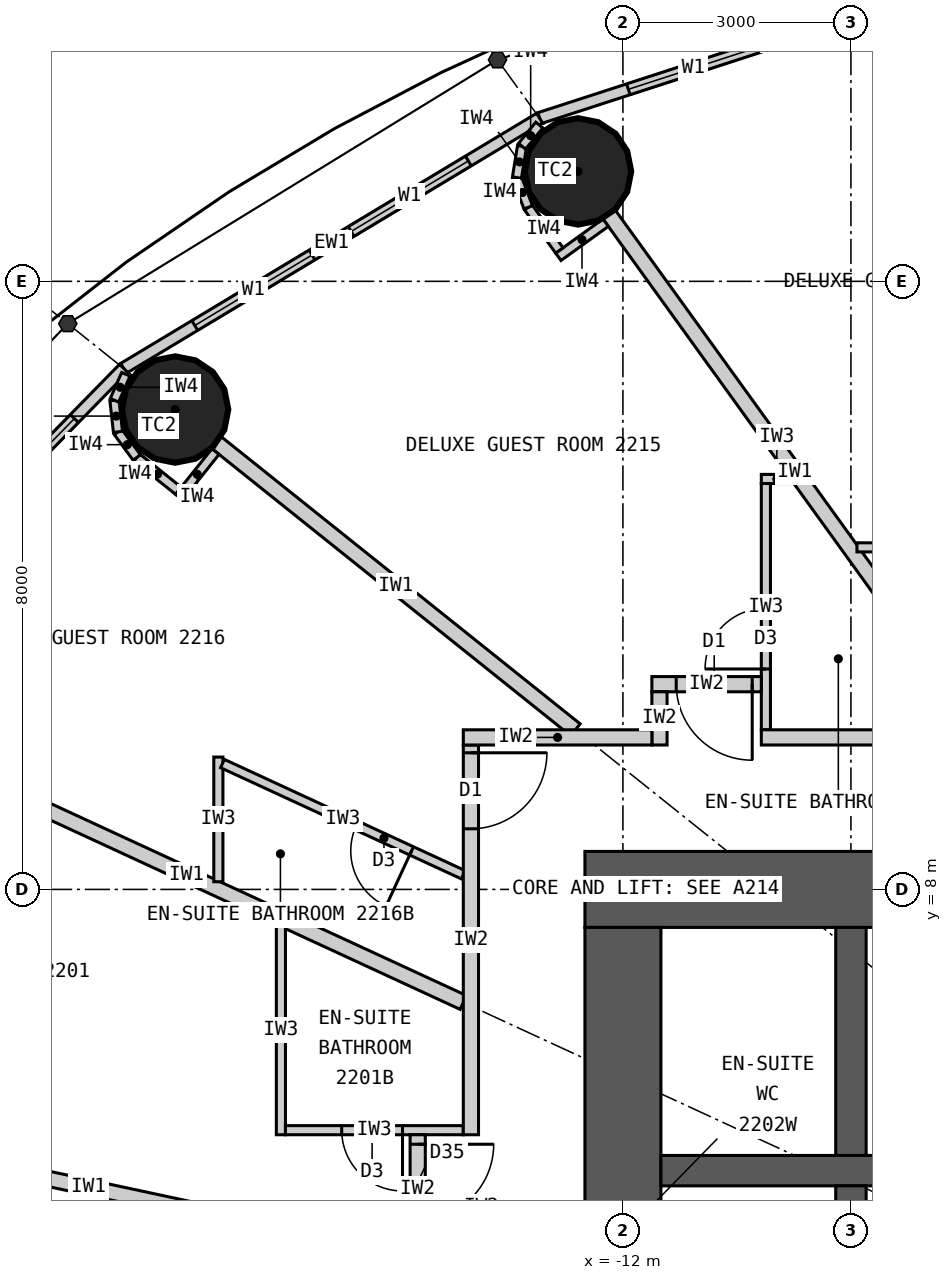
"""IFC4 building model, lengths in metres.
Left out: names, types, materials, properties, quantities, classifications, styles, units other than length and angle.
Written with IfcOpenShell. Run it as: python <this file> out.ifc"""

import sys

from ifc_helpers import new_model, si_unit, direction, frame, frame_2d, origin, origin_2d, place, context, subcontext, project, spatial, rectangle, circle, extrude, element, fill, save


model = new_model("IFC4")
c1 = context("Model", 3, precision=1e-05, world=origin(), true_north=direction((0.0, 1.0)))
c2 = subcontext(c1, "Body", "Model", "MODEL_VIEW")
j1 = project(units=[si_unit("LENGTHUNIT", "METRE"), si_unit("PLANEANGLEUNIT", "RADIAN")], contexts=[c1])
p1 = place(None, origin())
s1 = spatial("IfcSite", under=j1, at=p1, CompositionType="ELEMENT")
p2 = place(p1, origin())
s2 = spatial("IfcBuilding", under=s1, at=p2, CompositionType="ELEMENT")
p3 = place(p2, frame((0.0, 0.0, 87.0)))
s3 = spatial("IfcBuildingStorey", under=s2, at=p3, CompositionType="ELEMENT", Elevation=87.0)
for number, where, z_axis, x_axis in (
    (1, (-12.591, 17.447, 0.0), (0.0, 0.0, 1.0), (1.0, 0.0, 0.0)),
    (2, (-17.892, 14.313, 0.0), (0.0, 0.0, 1.0), (1.0, 0.0, 0.0)),
):
    element("IfcColumn", number, at=place(p3, frame(where, z_axis=z_axis, x_axis=x_axis)), inside=s3, PredefinedType="COLUMN", context=c2, shape_type="SweptSolid", body=[
        extrude(circle(Radius=0.7, at=origin_2d()), origin(), (0.0, 0.0, 1.0), 3.3),
    ])
p4 = place(p3, frame((-12.5, 8.0, 0.0), z_axis=(0.0, 0.0, 1.0), x_axis=(1.0, 0.0, 0.0)))
e3 = element("IfcWall", 3, at=p4, inside=s3, PredefinedType="SHEAR", context=c2, shape_type="SweptSolid", body=[
    extrude(rectangle(XDim=25.0, YDim=1.0, at=frame_2d((12.5, 0.0))), origin(), (0.0, 0.0, 1.0), 3.3),
])
p5 = place(p4, frame((11.2, 0.0, 0.0)))
e4 = element("IfcOpeningElement", 4, at=p5, cuts=e3, PredefinedType="OPENING", context=c2, shape_type="SweptSolid", body=[
    extrude(rectangle(XDim=1.2, YDim=2.2, at=frame_2d((0.6, 1.1))), frame((0.0, 0.51, 0.0), z_axis=(0.0, -1.0, 0.0), x_axis=(1.0, 0.0, 0.0)), (0.0, 0.0, 1.0), 1.02),
])
p6 = place(p4, frame((18.8, 0.0, 0.0)))
e5 = element("IfcOpeningElement", 5, at=p6, cuts=e3, PredefinedType="OPENING", context=c2, shape_type="SweptSolid", body=[
    extrude(rectangle(XDim=0.9, YDim=2.2, at=frame_2d((0.45, 1.1))), frame((0.0, 0.51, 0.0), z_axis=(0.0, -1.0, 0.0), x_axis=(1.0, 0.0, 0.0)), (0.0, 0.0, 1.0), 1.02),
])
p7 = place(p3, frame((-12.0, 7.5, 0.0), z_axis=(0.0, 0.0, 1.0), x_axis=(0.0, -1.0, 0.0)))
e6 = element("IfcWall", 6, at=p7, inside=s3, PredefinedType="SHEAR", context=c2, shape_type="SweptSolid", body=[
    extrude(rectangle(XDim=15.0, YDim=1.0, at=frame_2d((7.5, 0.0))), origin(), (0.0, 0.0, 1.0), 3.3),
])
p8 = place(p7, frame((6.6, 0.0, 0.0)))
e7 = element("IfcOpeningElement", 7, at=p8, cuts=e6, PredefinedType="OPENING", context=c2, shape_type="SweptSolid", body=[
    extrude(rectangle(XDim=1.8, YDim=2.2, at=frame_2d((0.9, 1.1))), frame((0.0, 0.51, 0.0), z_axis=(0.0, -1.0, 0.0), x_axis=(1.0, 0.0, 0.0)), (0.0, 0.0, 1.0), 1.02),
])
p9 = place(p3, frame((-11.5, 4.3, 0.0), z_axis=(0.0, 0.0, 1.0), x_axis=(1.0, 0.0, 0.0)))
e8 = element("IfcWall", 8, at=p9, inside=s3, PredefinedType="SHEAR", context=c2, shape_type="SweptSolid", body=[
    extrude(rectangle(XDim=23.0, YDim=0.4, at=frame_2d((11.5, 0.0))), origin(), (0.0, 0.0, 1.0), 3.3),
])
p10 = place(p3, frame((-9.0, 4.5, 0.0), z_axis=(0.0, 0.0, 1.0), x_axis=(0.0, 1.0, 0.0)))
e9 = element("IfcWall", 9, at=p10, inside=s3, PredefinedType="SHEAR", context=c2, shape_type="SweptSolid", body=[
    extrude(rectangle(XDim=3.0, YDim=0.4, at=frame_2d((1.5, 0.0))), origin(), (0.0, 0.0, 1.0), 3.3),
])
p11 = place(p3, frame((-9.0, 1.75, 0.0), z_axis=(0.0, 0.0, 1.0), x_axis=(0.0, 1.0, 0.0)))
e10 = element("IfcWall", 10, at=p11, inside=s3, PredefinedType="SHEAR", context=c2, shape_type="SweptSolid", body=[
    extrude(rectangle(XDim=2.35, YDim=0.4, at=frame_2d((1.175, 0.0))), origin(), (0.0, 0.0, 1.0), 3.3),
])
p12 = place(p3, frame((-6.766, 20.202, 0.0), z_axis=(0.0, 0.0, 1.0), x_axis=(-0.951137534625, -0.308767534285, 0.0)))
e11 = element("IfcWall", 11, at=p12, inside=s3, PredefinedType="ELEMENTEDWALL", context=c2, shape_type="SweptSolid", body=[
    extrude(rectangle(XDim=6.655, YDim=0.15, at=frame_2d((3.328, 0.0))), origin(), (0.0, 0.0, 1.0), 3.12),
])
p13 = place(p12, frame((1.228, 0.0, 0.9)))
e12 = element("IfcOpeningElement", 12, at=p13, cuts=e11, PredefinedType="OPENING", context=c2, shape_type="SweptSolid", body=[
    extrude(rectangle(XDim=1.8, YDim=1.9, at=frame_2d((0.9, 0.95))), frame((0.0, 0.085, 0.0), z_axis=(0.0, -1.0, 0.0), x_axis=(1.0, 0.0, 0.0)), (0.0, 0.0, 1.0), 0.17),
])
p14 = place(p12, frame((3.628, 0.0, 0.9)))
e13 = element("IfcOpeningElement", 13, at=p14, cuts=e11, PredefinedType="OPENING", context=c2, shape_type="SweptSolid", body=[
    extrude(rectangle(XDim=1.8, YDim=1.9, at=frame_2d((0.9, 0.95))), frame((0.0, 0.085, 0.0), z_axis=(0.0, -1.0, 0.0), x_axis=(1.0, 0.0, 0.0)), (0.0, 0.0, 1.0), 0.17),
])
p15 = place(p3, frame((-13.096, 18.147, 0.0), z_axis=(0.0, 0.0, 1.0), x_axis=(-0.856983180864, -0.515344377787, 0.0)))
e14 = element("IfcWall", 14, at=p15, inside=s3, PredefinedType="ELEMENTEDWALL", context=c2, shape_type="SweptSolid", body=[
    extrude(rectangle(XDim=6.386, YDim=0.15, at=frame_2d((3.193, 0.0))), origin(), (0.0, 0.0, 1.0), 3.12),
])
p16 = place(p15, frame((1.093, 0.0, 0.9)))
e15 = element("IfcOpeningElement", 15, at=p16, cuts=e14, PredefinedType="OPENING", context=c2, shape_type="SweptSolid", body=[
    extrude(rectangle(XDim=1.8, YDim=1.9, at=frame_2d((0.9, 0.95))), frame((0.0, 0.085, 0.0), z_axis=(0.0, -1.0, 0.0), x_axis=(1.0, 0.0, 0.0)), (0.0, 0.0, 1.0), 0.17),
])
p17 = place(p15, frame((3.493, 0.0, 0.9)))
e16 = element("IfcOpeningElement", 16, at=p17, cuts=e14, PredefinedType="OPENING", context=c2, shape_type="SweptSolid", body=[
    extrude(rectangle(XDim=1.8, YDim=1.9, at=frame_2d((0.9, 0.95))), frame((0.0, 0.085, 0.0), z_axis=(0.0, -1.0, 0.0), x_axis=(1.0, 0.0, 0.0)), (0.0, 0.0, 1.0), 0.17),
])
p18 = place(p3, frame((-18.57, 14.856, 0.0), z_axis=(0.0, 0.0, 1.0), x_axis=(-0.699602905915, -0.714531856557, 0.0)))
e17 = element("IfcWall", 17, at=p18, inside=s3, PredefinedType="ELEMENTEDWALL", context=c2, shape_type="SweptSolid", body=[
    extrude(rectangle(XDim=6.051, YDim=0.15, at=frame_2d((3.025, 0.0))), origin(), (0.0, 0.0, 1.0), 3.12),
])
p19 = place(p18, frame((0.926, 0.0, 0.9)))
e18 = element("IfcOpeningElement", 18, at=p19, cuts=e17, PredefinedType="OPENING", context=c2, shape_type="SweptSolid", body=[
    extrude(rectangle(XDim=1.8, YDim=1.9, at=frame_2d((0.9, 0.95))), frame((0.0, 0.085, 0.0), z_axis=(0.0, -1.0, 0.0), x_axis=(1.0, 0.0, 0.0)), (0.0, 0.0, 1.0), 0.17),
])
p20 = place(p18, frame((3.325, 0.0, 0.9)))
e19 = element("IfcOpeningElement", 19, at=p20, cuts=e17, PredefinedType="OPENING", context=c2, shape_type="SweptSolid", body=[
    extrude(rectangle(XDim=1.8, YDim=1.9, at=frame_2d((0.9, 0.95))), frame((0.0, 0.085, 0.0), z_axis=(0.0, -1.0, 0.0), x_axis=(1.0, 0.0, 0.0)), (0.0, 0.0, 1.0), 0.17),
])
p21 = place(p3, frame((-7.289, 10.1, 0.0), z_axis=(0.0, 0.0, 1.0), x_axis=(-0.585198353053, 0.810890182197, 0.0)))
e20 = element("IfcWall", 20, at=p21, inside=s3, PredefinedType="PARTITIONING", context=c2, shape_type="SweptSolid", body=[
    extrude(rectangle(XDim=8.36, YDim=0.2, at=frame_2d((4.18, 0.0))), origin(), (0.0, 0.0, 1.0), 2.27),
])
p22 = place(p3, frame((-12.625, 10.1, 0.0), z_axis=(0.0, 0.0, 1.0), x_axis=(-0.780892451574, 0.624665493744, 0.0)))
e21 = element("IfcWall", 21, at=p22, inside=s3, PredefinedType="PARTITIONING", context=c2, shape_type="SweptSolid", body=[
    extrude(rectangle(XDim=6.045, YDim=0.2, at=frame_2d((3.022, 0.0))), origin(), (0.0, 0.0, 1.0), 2.27),
])
p23 = place(p3, frame((-14.1, 6.512, 0.0), z_axis=(0.0, 0.0, 1.0), x_axis=(-0.907832871056, 0.419332181247, 0.0)))
e22 = element("IfcWall", 22, at=p23, inside=s3, PredefinedType="PARTITIONING", context=c2, shape_type="SweptSolid", body=[
    extrude(rectangle(XDim=8.023, YDim=0.2, at=frame_2d((4.011, 0.0))), origin(), (0.0, 0.0, 1.0), 2.22),
])
p24 = place(p3, frame((-14.1, 3.022, 0.0), z_axis=(0.0, 0.0, 1.0), x_axis=(-0.977790014929, 0.209586943072, 0.0)))
e23 = element("IfcWall", 23, at=p24, inside=s3, PredefinedType="PARTITIONING", context=c2, shape_type="SweptSolid", body=[
    extrude(rectangle(XDim=10.087, YDim=0.2, at=frame_2d((5.043, 0.0))), origin(), (0.0, 0.0, 1.0), 2.27),
])
p25 = place(p3, frame((-16.5, 7.521, 0.0), z_axis=(0.0, 0.0, 1.0), x_axis=(0.0, -1.0, 0.0)))
e24 = element("IfcWall", 24, at=p25, inside=s3, PredefinedType="PARTITIONING", context=c2, shape_type="SweptSolid", body=[
    extrude(rectangle(XDim=2.749, YDim=0.12, at=frame_2d((1.374, 0.0))), origin(), (0.0, 0.0, 1.0), 3.12),
])
p26 = place(p3, frame((-14.1, 4.833, 0.0), z_axis=(0.0, 0.0, 1.0), x_axis=(-1.0, 0.0, 0.0)))
e25 = element("IfcWall", 25, at=p26, inside=s3, PredefinedType="PARTITIONING", context=c2, shape_type="SweptSolid", body=[
    extrude(rectangle(XDim=2.34, YDim=0.12, at=frame_2d((1.17, 0.0))), origin(), (0.0, 0.0, 1.0), 3.12),
])
p27 = place(p26, frame((0.8, 0.0, 0.0)))
e26 = element("IfcOpeningElement", 26, at=p27, cuts=e25, PredefinedType="OPENING", context=c2, shape_type="SweptSolid", body=[
    extrude(rectangle(XDim=0.8, YDim=2.1, at=frame_2d((0.4, 1.05))), frame((0.0, 0.07, 0.0), z_axis=(0.0, -1.0, 0.0), x_axis=(1.0, 0.0, 0.0)), (0.0, 0.0, 1.0), 0.14),
])
p28 = place(p3, frame((-8.921, 12.5, 0.0), z_axis=(0.0, 0.0, 1.0), x_axis=(1.0, 0.0, 0.0)))
e27 = element("IfcWall", 27, at=p28, inside=s3, PredefinedType="PARTITIONING", context=c2, shape_type="SweptSolid", body=[
    extrude(rectangle(XDim=3.372, YDim=0.12, at=frame_2d((1.686, 0.0))), origin(), (0.0, 0.0, 1.0), 3.12),
])
p29 = place(p3, frame((-9.771, 13.4, 0.0), z_axis=(0.0, 0.0, 1.0), x_axis=(-1.0, 0.0, 0.0)))
e28 = element("IfcWall", 28, at=p29, inside=s3, PredefinedType="PARTITIONING", context=c2, shape_type="SweptSolid", body=[
    extrude(rectangle(XDim=0.408, YDim=0.12, at=frame_2d((0.204, 0.0))), origin(), (0.0, 0.0, 1.0), 3.12),
])
p30 = place(p3, frame((-10.119, 10.1, 0.0), z_axis=(0.0, 0.0, 1.0), x_axis=(0.0, 1.0, 0.0)))
e29 = element("IfcWall", 29, at=p30, inside=s3, PredefinedType="PARTITIONING", context=c2, shape_type="SweptSolid", body=[
    extrude(rectangle(XDim=3.24, YDim=0.12, at=frame_2d((1.62, 0.0))), origin(), (0.0, 0.0, 1.0), 3.12),
])
p31 = place(p30, frame((0.8, 0.0, 0.0)))
e30 = element("IfcOpeningElement", 30, at=p31, cuts=e29, PredefinedType="OPENING", context=c2, shape_type="SweptSolid", body=[
    extrude(rectangle(XDim=0.8, YDim=2.1, at=frame_2d((0.4, 1.05))), frame((0.0, 0.07, 0.0), z_axis=(0.0, -1.0, 0.0), x_axis=(1.0, 0.0, 0.0)), (0.0, 0.0, 1.0), 0.14),
])
p32 = place(p3, frame((-17.323, 8.101, 0.0), z_axis=(0.0, 0.0, 1.0), x_axis=(0.0, 1.0, 0.0)))
e31 = element("IfcWall", 31, at=p32, inside=s3, PredefinedType="PARTITIONING", context=c2, shape_type="SweptSolid", body=[
    extrude(rectangle(XDim=1.64, YDim=0.12, at=frame_2d((0.82, 0.0))), origin(), (0.0, 0.0, 1.0), 3.12),
])
p33 = place(p3, frame((-14.1, 8.193, 0.0), z_axis=(0.0, 0.0, 1.0), x_axis=(-0.907836493557, 0.419324338628, 0.0)))
e32 = element("IfcWall", 32, at=p33, inside=s3, PredefinedType="PARTITIONING", context=c2, shape_type="SweptSolid", body=[
    extrude(rectangle(XDim=3.49, YDim=0.12, at=frame_2d((1.745, 0.0))), origin(), (0.0, 0.0, 1.0), 3.12),
])
p34 = place(p33, frame((0.75, 0.0, 0.0)))
e33 = element("IfcOpeningElement", 33, at=p34, cuts=e32, PredefinedType="OPENING", context=c2, shape_type="SweptSolid", body=[
    extrude(rectangle(XDim=0.8, YDim=2.1, at=frame_2d((0.4, 1.05))), frame((0.0, 0.07, 0.0), z_axis=(0.0, -1.0, 0.0), x_axis=(1.0, 0.0, 0.0)), (0.0, 0.0, 1.0), 0.14),
])
p35 = place(p3, frame((-14.7, 4.772, 0.0), z_axis=(0.0, 0.0, 1.0), x_axis=(0.0, -1.0, 0.0)))
e34 = element("IfcWall", 34, at=p35, inside=s3, PredefinedType="PARTITIONING", context=c2, shape_type="SweptSolid", body=[
    extrude(rectangle(XDim=1.44, YDim=0.2, at=frame_2d((0.72, 0.0))), origin(), (0.0, 0.0, 1.0), 3.12),
])
p36 = place(p35, frame((0.125, 0.0, 0.0)))
e35 = element("IfcOpeningElement", 35, at=p36, cuts=e34, PredefinedType="OPENING", context=c2, shape_type="SweptSolid", body=[
    extrude(rectangle(XDim=1.0, YDim=2.0, at=frame_2d((0.5, 1.0))), frame((0.0, 0.11, 0.0), z_axis=(0.0, -1.0, 0.0), x_axis=(1.0, 0.0, 0.0)), (0.0, 0.0, 1.0), 0.22),
])
p37 = place(p3, frame((-11.619, 10.7, 0.0), z_axis=(0.0, 0.0, 1.0), x_axis=(1.0, 0.0, 0.0)))
e36 = element("IfcWall", 36, at=p37, inside=s3, PredefinedType="PARTITIONING", context=c2, shape_type="SweptSolid", body=[
    extrude(rectangle(XDim=1.44, YDim=0.2, at=frame_2d((0.72, 0.0))), origin(), (0.0, 0.0, 1.0), 3.12),
])
p38 = place(p37, frame((0.32, 0.0, 0.0)))
e37 = element("IfcOpeningElement", 37, at=p38, cuts=e36, PredefinedType="OPENING", context=c2, shape_type="SweptSolid", body=[
    extrude(rectangle(XDim=1.0, YDim=2.2, at=frame_2d((0.5, 1.1))), frame((0.0, 0.11, 0.0), z_axis=(0.0, -1.0, 0.0), x_axis=(1.0, 0.0, 0.0)), (0.0, 0.0, 1.0), 0.22),
])
p39 = place(p3, frame((-11.519, 9.9, 0.0), z_axis=(0.0, 0.0, 1.0), x_axis=(0.0, 1.0, 0.0)))
e38 = element("IfcWall", 38, at=p39, inside=s3, PredefinedType="PARTITIONING", context=c2, shape_type="SweptSolid", body=[
    extrude(rectangle(XDim=0.7, YDim=0.2, at=frame_2d((0.35, 0.0))), origin(), (0.0, 0.0, 1.0), 3.12),
])
p40 = place(p3, frame((-14.0, 9.9, 0.0), z_axis=(0.0, 0.0, 1.0), x_axis=(0.0, -1.0, 0.0)))
e39 = element("IfcWall", 39, at=p40, inside=s3, PredefinedType="PARTITIONING", context=c2, shape_type="SweptSolid", body=[
    extrude(rectangle(XDim=5.127, YDim=0.2, at=frame_2d((2.564, 0.0))), origin(), (0.0, 0.0, 1.0), 3.12),
])
p41 = place(p40, frame((0.103, 0.0, 0.0)))
e40 = element("IfcOpeningElement", 40, at=p41, cuts=e39, PredefinedType="OPENING", context=c2, shape_type="SweptSolid", body=[
    extrude(rectangle(XDim=1.0, YDim=2.2, at=frame_2d((0.5, 1.1))), frame((0.0, 0.11, 0.0), z_axis=(0.0, -1.0, 0.0), x_axis=(1.0, 0.0, 0.0)), (0.0, 0.0, 1.0), 0.22),
])
p42 = place(p3, frame((-14.1, 10.0, 0.0), z_axis=(0.0, 0.0, 1.0), x_axis=(1.0, 0.0, 0.0)))
e41 = element("IfcWall", 41, at=p42, inside=s3, PredefinedType="PARTITIONING", context=c2, shape_type="SweptSolid", body=[
    extrude(rectangle(XDim=2.481, YDim=0.2, at=frame_2d((1.24, 0.0))), origin(), (0.0, 0.0, 1.0), 3.12),
])
p43 = place(p3, frame((-10.179, 10.0, 0.0), z_axis=(0.0, 0.0, 1.0), x_axis=(1.0, 0.0, 0.0)))
e42 = element("IfcWall", 42, at=p43, inside=s3, PredefinedType="PARTITIONING", context=c2, shape_type="SweptSolid", body=[
    extrude(rectangle(XDim=4.63, YDim=0.2, at=frame_2d((2.315, 0.0))), origin(), (0.0, 0.0, 1.0), 3.12),
])
p44 = place(p3, frame((-12.227, 16.772, 0.0), z_axis=(0.0, 0.0, 1.0), x_axis=(-0.810821798253, -0.585293098778, 0.0)))
e43 = element("IfcWall", 43, at=p44, inside=s3, PredefinedType="PARTITIONING", context=c2, shape_type="SweptSolid", body=[
    extrude(rectangle(XDim=0.768, YDim=0.12, at=frame_2d((0.384, 0.0))), origin(), (0.0, 0.0, 1.0), 3.12),
])
p45 = place(p3, frame((-12.836, 16.406, 0.0), z_axis=(0.0, 0.0, 1.0), x_axis=(-0.585223113993, 0.810872312296, 0.0)))
e44 = element("IfcWall", 44, at=p45, inside=s3, PredefinedType="PARTITIONING", context=c2, shape_type="SweptSolid", body=[
    extrude(rectangle(XDim=0.7, YDim=0.12, at=frame_2d((0.35, 0.0))), origin(), (0.0, 0.0, 1.0), 3.12),
])
p46 = place(p3, frame((-13.246, 16.974, 0.0), z_axis=(0.0, 0.0, 1.0), x_axis=(-0.355728122235, 0.934589483705, 0.0)))
e45 = element("IfcWall", 45, at=p46, inside=s3, PredefinedType="PARTITIONING", context=c2, shape_type="SweptSolid", body=[
    extrude(rectangle(XDim=0.418, YDim=0.12, at=frame_2d((0.209, 0.0))), origin(), (0.0, 0.0, 1.0), 3.12),
])
p47 = place(p3, frame((-13.394, 17.365, 0.0), z_axis=(0.0, 0.0, 1.0), x_axis=(0.159379276926, 0.987217425943, 0.0)))
e46 = element("IfcWall", 46, at=p47, inside=s3, PredefinedType="PARTITIONING", context=c2, shape_type="SweptSolid", body=[
    extrude(rectangle(XDim=0.418, YDim=0.12, at=frame_2d((0.209, 0.0))), origin(), (0.0, 0.0, 1.0), 3.12),
])
p48 = place(p3, frame((-13.328, 17.777, 0.0), z_axis=(0.0, 0.0, 1.0), x_axis=(0.632276783541, 0.774742582407, 0.0)))
e47 = element("IfcWall", 47, at=p48, inside=s3, PredefinedType="PARTITIONING", context=c2, shape_type="SweptSolid", body=[
    extrude(rectangle(XDim=0.36, YDim=0.12, at=frame_2d((0.18, 0.0))), origin(), (0.0, 0.0, 1.0), 3.12),
])
p49 = place(p3, frame((-17.361, 13.76, 0.0), z_axis=(0.0, 0.0, 1.0), x_axis=(-0.624501042889, -0.781023973659, 0.0)))
e48 = element("IfcWall", 48, at=p49, inside=s3, PredefinedType="PARTITIONING", context=c2, shape_type="SweptSolid", body=[
    extrude(rectangle(XDim=0.767, YDim=0.12, at=frame_2d((0.384, 0.0))), origin(), (0.0, 0.0, 1.0), 3.12),
])
p50 = place(p3, frame((-17.85, 13.246, 0.0), z_axis=(0.0, 0.0, 1.0), x_axis=(-0.780902834923, 0.62465251333, 0.0)))
e49 = element("IfcWall", 49, at=p50, inside=s3, PredefinedType="PARTITIONING", context=c2, shape_type="SweptSolid", body=[
    extrude(rectangle(XDim=0.7, YDim=0.12, at=frame_2d((0.35, 0.0))), origin(), (0.0, 0.0, 1.0), 3.12),
])
for number, where, z_axis, x_axis in (
    (50, (-18.396, 13.683, 0.0), (0.0, 0.0, 1.0), (-0.592, 0.806, 0.0)),
    (51, (-18.644, 14.02, 0.0), (0.0, 0.0, 1.0), (-0.11, 0.994, 0.0)),
):
    element("IfcWall", number, at=place(p3, frame(where, z_axis=z_axis, x_axis=x_axis)), inside=s3, PredefinedType="PARTITIONING", context=c2, shape_type="SweptSolid", body=[
        extrude(rectangle(XDim=0.418, YDim=0.12, at=frame_2d((0.209, 0.0))), origin(), (0.0, 0.0, 1.0), 3.12),
    ])
p51 = place(p3, frame((-18.69, 14.435, 0.0), z_axis=(0.0, 0.0, 1.0), x_axis=(0.401093412634, 0.91603715773, 0.0)))
e52 = element("IfcWall", 52, at=p51, inside=s3, PredefinedType="PARTITIONING", context=c2, shape_type="SweptSolid", body=[
    extrude(rectangle(XDim=0.373, YDim=0.12, at=frame_2d((0.187, 0.0))), origin(), (0.0, 0.0, 1.0), 3.12),
])
p52 = place(p14, origin())
e53 = element("IfcWindow", 53, at=p52, inside=s3, PartitioningType="SINGLE_PANEL", PredefinedType="WINDOW", context=c2, shape_type="SweptSolid", body=[
    extrude(rectangle(XDim=1.8, YDim=1.9, at=frame_2d((0.9, 0.95))), frame((0.0, 0.03, 0.0), z_axis=(0.0, -1.0, 0.0), x_axis=(1.0, 0.0, 0.0)), (0.0, 0.0, 1.0), 0.06),
])
fill(e13, e53)
p53 = place(p16, origin())
e54 = element("IfcWindow", 54, at=p53, inside=s3, PartitioningType="SINGLE_PANEL", PredefinedType="WINDOW", context=c2, shape_type="SweptSolid", body=[
    extrude(rectangle(XDim=1.8, YDim=1.9, at=frame_2d((0.9, 0.95))), frame((0.0, 0.03, 0.0), z_axis=(0.0, -1.0, 0.0), x_axis=(1.0, 0.0, 0.0)), (0.0, 0.0, 1.0), 0.06),
])
fill(e15, e54)
p54 = place(p17, origin())
e55 = element("IfcWindow", 55, at=p54, inside=s3, PartitioningType="SINGLE_PANEL", PredefinedType="WINDOW", context=c2, shape_type="SweptSolid", body=[
    extrude(rectangle(XDim=1.8, YDim=1.9, at=frame_2d((0.9, 0.95))), frame((0.0, 0.03, 0.0), z_axis=(0.0, -1.0, 0.0), x_axis=(1.0, 0.0, 0.0)), (0.0, 0.0, 1.0), 0.06),
])
fill(e16, e55)
p55 = place(p19, origin())
e56 = element("IfcWindow", 56, at=p55, inside=s3, PartitioningType="SINGLE_PANEL", PredefinedType="WINDOW", context=c2, shape_type="SweptSolid", body=[
    extrude(rectangle(XDim=1.8, YDim=1.9, at=frame_2d((0.9, 0.95))), frame((0.0, 0.03, 0.0), z_axis=(0.0, -1.0, 0.0), x_axis=(1.0, 0.0, 0.0)), (0.0, 0.0, 1.0), 0.06),
])
fill(e18, e56)
p56 = place(p27, origin())
e57 = element("IfcDoor", 57, at=p56, inside=s3, OperationType="SINGLE_SWING_LEFT", PredefinedType="DOOR", context=c2, shape_type="SweptSolid", body=[
    extrude(rectangle(XDim=0.8, YDim=2.1, at=frame_2d((0.4, 1.05))), frame((0.0, 0.025, 0.0), z_axis=(0.0, -1.0, 0.0), x_axis=(1.0, 0.0, 0.0)), (0.0, 0.0, 1.0), 0.05),
])
fill(e26, e57)
p57 = place(p36, origin())
e58 = element("IfcDoor", 58, at=p57, inside=s3, OperationType="SINGLE_SWING_LEFT", PredefinedType="DOOR", context=c2, shape_type="SweptSolid", body=[
    extrude(rectangle(XDim=1.0, YDim=2.0, at=frame_2d((0.5, 1.0))), frame((0.0, 0.025, 0.0), z_axis=(0.0, -1.0, 0.0), x_axis=(1.0, 0.0, 0.0)), (0.0, 0.0, 1.0), 0.05),
])
fill(e35, e58)
p58 = place(p31, origin())
e59 = element("IfcDoor", 59, at=p58, inside=s3, OperationType="SINGLE_SWING_LEFT", PredefinedType="DOOR", context=c2, shape_type="SweptSolid", body=[
    extrude(rectangle(XDim=0.8, YDim=2.1, at=frame_2d((0.4, 1.05))), frame((0.0, 0.025, 0.0), z_axis=(0.0, -1.0, 0.0), x_axis=(1.0, 0.0, 0.0)), (0.0, 0.0, 1.0), 0.05),
])
fill(e30, e59)
p59 = place(p38, origin())
e60 = element("IfcDoor", 60, at=p59, inside=s3, OperationType="SINGLE_SWING_RIGHT", PredefinedType="DOOR", context=c2, shape_type="SweptSolid", body=[
    extrude(rectangle(XDim=1.0, YDim=2.2, at=frame_2d((0.5, 1.1))), frame((0.0, 0.025, 0.0), z_axis=(0.0, -1.0, 0.0), x_axis=(1.0, 0.0, 0.0)), (0.0, 0.0, 1.0), 0.05),
])
fill(e37, e60)
p60 = place(p34, origin())
e61 = element("IfcDoor", 61, at=p60, inside=s3, OperationType="SINGLE_SWING_LEFT", PredefinedType="DOOR", context=c2, shape_type="SweptSolid", body=[
    extrude(rectangle(XDim=0.8, YDim=2.1, at=frame_2d((0.4, 1.05))), frame((0.0, 0.025, 0.0), z_axis=(0.0, -1.0, 0.0), x_axis=(1.0, 0.0, 0.0)), (0.0, 0.0, 1.0), 0.05),
])
fill(e33, e61)
p61 = place(p41, origin())
e62 = element("IfcDoor", 62, at=p61, inside=s3, OperationType="SINGLE_SWING_LEFT", PredefinedType="DOOR", context=c2, shape_type="SweptSolid", body=[
    extrude(rectangle(XDim=1.0, YDim=2.2, at=frame_2d((0.5, 1.1))), frame((0.0, 0.025, 0.0), z_axis=(0.0, -1.0, 0.0), x_axis=(1.0, 0.0, 0.0)), (0.0, 0.0, 1.0), 0.05),
])
fill(e40, e62)
save(model, sys.argv[1])
